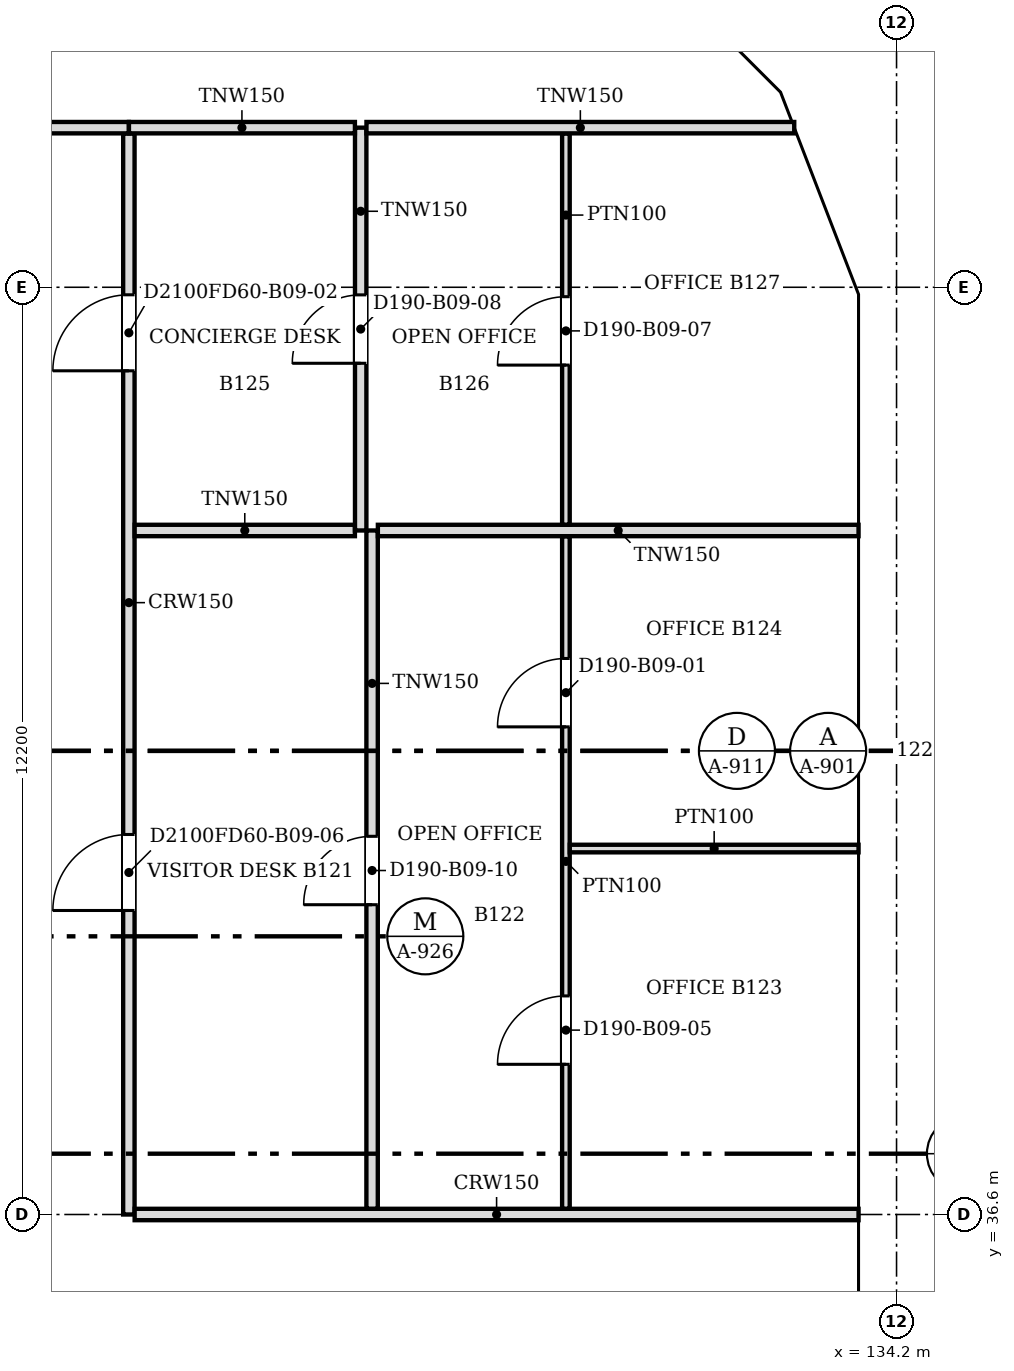
"""IFC4 building model, lengths in metres.
Left out: names, types, materials, properties, quantities, classifications, styles, units other than length and angle.
Written with IfcOpenShell. Run it as: python <this file> out.ifc"""

import sys

from ifc_helpers import new_model, si_unit, direction, frame, frame_2d, origin, place, context, subcontext, project, spatial, polyline, rectangle, outline, extrude, faceted_brep, source, transform, mapped, element, fill, save


model = new_model("IFC4")
c1 = context("Model", 3, precision=1e-05, world=origin(), true_north=direction((0.0, 1.0)))
c2 = subcontext(c1, "Body", "Model", "MODEL_VIEW")
j1 = project(units=[si_unit("LENGTHUNIT", "METRE"), si_unit("PLANEANGLEUNIT", "RADIAN")], contexts=[c1])
p1 = place(None, origin())
s1 = spatial("IfcSite", under=j1, at=p1, CompositionType="ELEMENT")
p2 = place(p1, origin())
s2 = spatial("IfcBuilding", under=s1, at=p2, CompositionType="ELEMENT")
p3 = place(p2, frame((0.0, 0.0, 91.4)))
s3 = spatial("IfcBuildingStorey", under=s2, at=p3, CompositionType="ELEMENT", Elevation=91.4)
m1 = source(origin(), c2, "Body", "SweptSolid", [
    extrude(outline(polyline([(3.05, 0.0), (6.1, 3.8), (3.05, 7.6), (0.0, 3.8), (3.05, 0.0)])), frame((0.0, 0.25, 0.0), z_axis=(0.0, -1.0, 0.0), x_axis=(1.0, 0.0, 0.0)), (0.0, 0.0, 1.0), 0.5),
])
p4 = place(p3, frame((133.95, 30.5, -3.8), z_axis=(0.0, 0.0, 1.0), x_axis=(0.0, 1.0, 0.0)))
e1 = element("IfcWall", 1, at=p4, inside=s3, PredefinedType="SOLIDWALL", context=c2, shape_type="MappedRepresentation", body=[
    mapped(m1, transform((0.0, 0.0, 0.0), scale=1.0)),
])
m2 = source(origin(), c2, "Body", "SweptSolid", [
    extrude(outline(polyline([(3.05, 0.399), (5.78, 3.8), (3.05, 7.2), (0.321, 3.8), (3.05, 0.399)])), frame((0.0, 0.26, 0.0), z_axis=(0.0, -1.0, 0.0), x_axis=(1.0, 0.0, 0.0)), (0.0, 0.0, 1.0), 0.52),
])
p5 = place(p4, origin())
e2 = element("IfcOpeningElement", 2, at=p5, cuts=e1, PredefinedType="OPENING", context=c2, shape_type="MappedRepresentation", body=[
    mapped(m2, transform((0.0, 0.0, 0.0), scale=1.0)),
])
m3 = source(origin(), c2, "Body", "Brep", [
    faceted_brep([(3.05, -0.25, 0.0), (6.1, -0.25, 3.8), (6.1, -0.25, 3.8), (3.05, -0.25, 7.6), (0.0, -0.25, 3.8), (0.0, 0.25, 3.8), (3.05, 0.25, 7.6), (6.1, 0.25, 3.8), (6.1, 0.25, 3.8), (3.05, 0.25, 0.0)], [[[0, 1, 2, 3, 4]], [[5, 6, 7, 8, 9]], [[9, 8, 1, 0]], [[7, 6, 3, 2]], [[6, 5, 4, 3]], [[5, 9, 0, 4]], [[1, 8, 7, 2]]]),
])
p6 = place(p3, frame((133.95, 36.6, -3.8), z_axis=(0.0, 0.0, 1.0), x_axis=(0.0, 1.0, 0.0)))
e3 = element("IfcWall", 3, at=p6, inside=s3, PredefinedType="SOLIDWALL", context=c2, shape_type="MappedRepresentation", body=[
    mapped(m3, transform((0.0, 0.0, 0.0), scale=1.0)),
])
p7 = place(p6, origin())
e4 = element("IfcOpeningElement", 4, at=p7, cuts=e3, PredefinedType="OPENING", context=c2, shape_type="MappedRepresentation", body=[
    mapped(m2, transform((0.0, 0.0, 0.0), scale=1.0)),
])
m4 = source(origin(), c2, "Body", "Brep", [
    faceted_brep([(3.05, -0.25, 0.0), (6.053, -0.25, 3.8), (3.05, -0.25, 7.6), (0.0, -0.25, 3.8), (0.0, 0.25, 3.8), (3.05, 0.25, 7.6), (6.007, 0.25, 3.859), (6.007, 0.25, 3.741), (3.05, 0.25, 0.0), (6.053, 0.0, 3.8)], [[[0, 1, 2, 3]], [[4, 5, 6, 7, 8]], [[8, 7, 9, 1, 0]], [[6, 5, 2, 1, 9]], [[5, 4, 3, 2]], [[4, 8, 0, 3]], [[9, 7, 6]]]),
])
p8 = place(p3, frame((133.95, 42.7, -3.8), z_axis=(0.0, 0.0, 1.0), x_axis=(0.0, 1.0, 0.0)))
e5 = element("IfcWall", 5, at=p8, inside=s3, PredefinedType="SOLIDWALL", context=c2, shape_type="MappedRepresentation", body=[
    mapped(m4, transform((0.0, 0.0, 0.0), scale=1.0)),
])
m5 = source(origin(), c2, "Body", "SweptSolid", [
    extrude(outline(polyline([(3.049, 0.401), (5.735, 3.8), (3.049, 7.199), (0.321, 3.8), (3.049, 0.401)])), frame((0.0, 0.26, 0.0), z_axis=(0.0, -1.0, 0.0), x_axis=(1.0, 0.0, 0.0)), (0.0, 0.0, 1.0), 0.52),
])
p9 = place(p8, origin())
e6 = element("IfcOpeningElement", 6, at=p9, cuts=e5, PredefinedType="OPENING", context=c2, shape_type="MappedRepresentation", body=[
    mapped(m5, transform((0.0, 0.0, 0.0), scale=1.0)),
])
m6 = source(origin(), c2, "Body", "Brep", [
    faceted_brep([(2.95, -0.25, 0.0), (3.003, -0.25, 0.068), (3.003, -0.25, 7.531), (2.95, -0.25, 7.6), (0.0, -0.25, 3.8), (0.047, 0.25, 3.86), (2.898, 0.25, 7.532), (2.898, 0.25, 0.068), (0.047, 0.25, 3.74), (2.95, 0.0, 0.0), (2.95, 0.0, 7.6), (0.0, 0.0, 3.8)], [[[0, 1, 2, 3, 4]], [[5, 6, 7, 8]], [[1, 0, 9]], [[10, 3, 2]], [[6, 5, 11, 4, 3, 10]], [[8, 7, 9, 0, 4, 11]], [[8, 11, 5]], [[1, 9, 7, 6, 10, 2]]]),
])
p10 = place(p3, frame((133.95, 48.753, -3.8), z_axis=(0.0, 0.0, 1.0), x_axis=(-0.359855894603, 0.933007896601, 0.0)))
e7 = element("IfcWall", 7, at=p10, inside=s3, PredefinedType="SOLIDWALL", context=c2, shape_type="MappedRepresentation", body=[
    mapped(m6, transform((0.0, 0.0, 0.0), scale=1.0)),
])
m7 = source(origin(), c2, "Body", "SweptSolid", [
    extrude(outline(polyline([(2.75, 6.935), (0.316, 3.8), (2.75, 0.665), (2.75, 6.935)])), frame((0.0, 0.26, 0.0), z_axis=(0.0, -1.0, 0.0), x_axis=(1.0, 0.0, 0.0)), (0.0, 0.0, 1.0), 0.52),
])
p11 = place(p10, origin())
e8 = element("IfcOpeningElement", 8, at=p11, cuts=e7, PredefinedType="OPENING", context=c2, shape_type="MappedRepresentation", body=[
    mapped(m7, transform((0.0, 0.0, 0.0), scale=1.0)),
])
m8 = source(origin(), c2, "Body", "Brep", [
    faceted_brep([(0.053, -0.25, 0.0), (2.997, -0.25, 3.8), (0.053, -0.25, 7.6), (0.0, -0.25, 7.532), (0.0, -0.25, 0.068), (0.106, 0.25, 7.531), (2.944, 0.25, 3.868), (2.944, 0.25, 3.732), (0.106, 0.25, 0.068), (2.997, 0.0, 3.8), (0.053, 0.0, 0.0), (0.053, 0.0, 7.6)], [[[0, 1, 2, 3, 4]], [[5, 6, 7, 8]], [[8, 7, 9, 1, 0, 10]], [[6, 5, 11, 2, 1, 9]], [[3, 2, 11]], [[10, 0, 4]], [[8, 10, 4, 3, 11, 5]], [[9, 7, 6]]]),
])
p12 = place(p3, frame((132.926, 51.469, -3.8), z_axis=(0.0, 0.0, 1.0), x_axis=(-0.707066050402, 0.707147509625, 0.0)))
e9 = element("IfcWall", 9, at=p12, inside=s3, PredefinedType="SOLIDWALL", context=c2, shape_type="MappedRepresentation", body=[
    mapped(m8, transform((0.0, 0.0, 0.0), scale=1.0)),
])
m9 = source(origin(), c2, "Body", "SweptSolid", [
    extrude(outline(polyline([(0.253, 0.666), (2.681, 3.8), (0.253, 6.934), (0.253, 0.666)])), frame((0.0, 0.26, 0.0), z_axis=(0.0, -1.0, 0.0), x_axis=(1.0, 0.0, 0.0)), (0.0, 0.0, 1.0), 0.52),
])
p13 = place(p12, origin())
e10 = element("IfcOpeningElement", 10, at=p13, cuts=e9, PredefinedType="OPENING", context=c2, shape_type="MappedRepresentation", body=[
    mapped(m9, transform((0.0, 0.0, 0.0), scale=1.0)),
])
m10 = source(origin(), c2, "Body", "Brep", [
    faceted_brep([(3.05, -0.25, 0.0), (6.1, -0.25, 3.8), (6.1, -0.25, 3.8), (0.0, -0.25, 3.8), (0.0, 0.25, 3.8), (6.1, 0.25, 3.8), (6.1, 0.25, 3.8), (3.05, 0.25, 0.0)], [[[0, 1, 2, 3]], [[4, 5, 6, 7]], [[7, 6, 1, 0]], [[5, 4, 3, 2]], [[4, 7, 0, 3]], [[1, 6, 5, 2]]]),
])
p14 = place(p3, frame((133.95, 33.55, 0.0), z_axis=(0.0, 0.0, 1.0), x_axis=(0.0, 1.0, 0.0)))
e11 = element("IfcWall", 11, at=p14, inside=s3, PredefinedType="SOLIDWALL", context=c2, shape_type="MappedRepresentation", body=[
    mapped(m10, transform((0.0, 0.0, 0.0), scale=1.0)),
])
m11 = source(origin(), c2, "Body", "SweptSolid", [
    extrude(outline(polyline([(3.05, 0.399), (5.579, 3.55), (0.521, 3.55), (3.05, 0.399)])), frame((0.0, 0.26, 0.0), z_axis=(0.0, -1.0, 0.0), x_axis=(1.0, 0.0, 0.0)), (0.0, 0.0, 1.0), 0.52),
])
p15 = place(p14, origin())
e12 = element("IfcOpeningElement", 12, at=p15, cuts=e11, PredefinedType="OPENING", context=c2, shape_type="MappedRepresentation", body=[
    mapped(m11, transform((0.0, 0.0, 0.0), scale=1.0)),
])
m12 = source(origin(), c2, "Body", "SweptSolid", [
    extrude(outline(polyline([(3.05, 0.0), (6.1, 3.8), (0.0, 3.8), (3.05, 0.0)])), frame((0.0, 0.25, 0.0), z_axis=(0.0, -1.0, 0.0), x_axis=(1.0, 0.0, 0.0)), (0.0, 0.0, 1.0), 0.5),
])
p16 = place(p3, frame((133.95, 39.65, 0.0), z_axis=(0.0, 0.0, 1.0), x_axis=(0.0, 1.0, 0.0)))
e13 = element("IfcWall", 13, at=p16, inside=s3, PredefinedType="SOLIDWALL", context=c2, shape_type="MappedRepresentation", body=[
    mapped(m12, transform((0.0, 0.0, 0.0), scale=1.0)),
])
p17 = place(p16, origin())
e14 = element("IfcOpeningElement", 14, at=p17, cuts=e13, PredefinedType="OPENING", context=c2, shape_type="MappedRepresentation", body=[
    mapped(m11, transform((0.0, 0.0, 0.0), scale=1.0)),
])
m13 = source(origin(), c2, "Body", "Brep", [
    faceted_brep([(3.003, -0.25, 0.0), (3.05, -0.25, 0.06), (3.05, -0.25, 3.8), (0.0, -0.25, 3.8), (0.0, 0.25, 3.8), (2.957, 0.25, 3.8), (2.957, 0.25, 0.059), (3.003, 0.0, 0.0)], [[[0, 1, 2, 3]], [[4, 5, 6]], [[1, 0, 7]], [[5, 4, 3, 2]], [[4, 6, 7, 0, 3]], [[1, 7, 6, 5, 2]]]),
])
p18 = place(p3, frame((133.95, 45.75, 0.0), z_axis=(0.0, 0.0, 1.0), x_axis=(0.0, 1.0, 0.0)))
e15 = element("IfcWall", 15, at=p18, inside=s3, PredefinedType="SOLIDWALL", context=c2, shape_type="MappedRepresentation", body=[
    mapped(m13, transform((0.0, 0.0, 0.0), scale=1.0)),
])
m14 = source(origin(), c2, "Body", "SweptSolid", [
    extrude(outline(polyline([(2.803, 3.55), (0.516, 3.55), (2.803, 0.656), (2.803, 3.55)])), frame((0.0, 0.26, 0.0), z_axis=(0.0, -1.0, 0.0), x_axis=(1.0, 0.0, 0.0)), (0.0, 0.0, 1.0), 0.52),
])
p19 = place(p18, origin())
e16 = element("IfcOpeningElement", 16, at=p19, cuts=e15, PredefinedType="OPENING", context=c2, shape_type="MappedRepresentation", body=[
    mapped(m14, transform((0.0, 0.0, 0.0), scale=1.0)),
])
m15 = source(origin(), c2, "Body", "Brep", [
    faceted_brep([(0.047, -0.25, 0.0), (2.997, -0.25, 3.8), (0.0, -0.25, 3.8), (0.0, -0.25, 0.059), (0.093, 0.25, 3.8), (2.944, 0.25, 3.8), (2.944, 0.25, 3.732), (0.093, 0.25, 0.06), (2.997, 0.0, 3.8), (0.047, 0.0, 0.0)], [[[0, 1, 2, 3]], [[4, 5, 6, 7]], [[7, 6, 8, 1, 0, 9]], [[5, 4, 2, 1, 8]], [[9, 0, 3]], [[7, 9, 3, 2, 4]], [[6, 5, 8]]]),
])
p20 = place(p3, frame((133.967, 48.71, 0.0), z_axis=(0.0, 0.0, 1.0), x_axis=(-0.359901446078, 0.932990326376, 0.0)))
e17 = element("IfcWall", 17, at=p20, inside=s3, PredefinedType="SOLIDWALL", context=c2, shape_type="MappedRepresentation", body=[
    mapped(m15, transform((0.0, 0.0, 0.0), scale=1.0)),
])
m16 = source(origin(), c2, "Body", "SweptSolid", [
    extrude(outline(polyline([(0.247, 0.665), (2.487, 3.55), (0.247, 3.55), (0.247, 0.665)])), frame((0.0, 0.26, 0.0), z_axis=(0.0, -1.0, 0.0), x_axis=(1.0, 0.0, 0.0)), (0.0, 0.0, 1.0), 0.52),
])
p21 = place(p20, origin())
e18 = element("IfcOpeningElement", 18, at=p21, cuts=e17, PredefinedType="OPENING", context=c2, shape_type="MappedRepresentation", body=[
    mapped(m16, transform((0.0, 0.0, 0.0), scale=1.0)),
])
m17 = source(origin(), c2, "Body", "Brep", [
    faceted_brep([(2.944, -0.25, 0.0), (2.997, -0.25, 0.068), (2.997, -0.25, 3.8), (0.0, -0.25, 3.8), (0.053, 0.25, 3.8), (2.891, 0.25, 3.8), (2.891, 0.25, 0.068), (0.053, 0.25, 3.732), (2.944, 0.0, 0.0), (0.0, 0.0, 3.8)], [[[0, 1, 2, 3]], [[4, 5, 6, 7]], [[1, 0, 8]], [[5, 4, 9, 3, 2]], [[7, 6, 8, 0, 3, 9]], [[7, 9, 4]], [[1, 8, 6, 5, 2]]]),
])
p22 = place(p3, frame((132.888, 51.506, 0.0), z_axis=(0.0, 0.0, 1.0), x_axis=(-0.707147509625, 0.707066050402, 0.0)))
e19 = element("IfcWall", 19, at=p22, inside=s3, PredefinedType="SOLIDWALL", context=c2, shape_type="MappedRepresentation", body=[
    mapped(m17, transform((0.0, 0.0, 0.0), scale=1.0)),
])
m18 = source(origin(), c2, "Body", "SweptSolid", [
    extrude(outline(polyline([(2.744, 3.55), (0.51, 3.55), (2.744, 0.667), (2.744, 3.55)])), frame((0.0, 0.26, 0.0), z_axis=(0.0, -1.0, 0.0), x_axis=(1.0, 0.0, 0.0)), (0.0, 0.0, 1.0), 0.52),
])
p23 = place(p22, origin())
e20 = element("IfcOpeningElement", 20, at=p23, cuts=e19, PredefinedType="OPENING", context=c2, shape_type="MappedRepresentation", body=[
    mapped(m18, transform((0.0, 0.0, 0.0), scale=1.0)),
])
p24 = place(p3, frame((124.1, 50.824, 0.0), z_axis=(0.0, 0.0, 1.0), x_axis=(0.0, -1.0, 0.0)))
e21 = element("IfcWall", 21, at=p24, inside=s3, PredefinedType="PARTITIONING", context=c2, shape_type="SweptSolid", body=[
    extrude(rectangle(XDim=14.224, YDim=0.15, at=frame_2d((7.112, 0.0))), origin(), (0.0, 0.0, 1.0), 2.895),
])
m19 = source(origin(), c2, "Body", "SweptSolid", [
    extrude(rectangle(XDim=1.0, YDim=2.1, at=frame_2d((0.5, 1.05))), frame((0.0, 0.085, 0.0), z_axis=(0.0, -1.0, 0.0), x_axis=(1.0, 0.0, 0.0)), (0.0, 0.0, 1.0), 0.17),
])
p25 = place(p24, frame((2.123, 0.0, 0.0)))
e22 = element("IfcOpeningElement", 22, at=p25, cuts=e21, PredefinedType="OPENING", context=c2, shape_type="MappedRepresentation", body=[
    mapped(m19, transform((0.0, 0.0, 0.0), scale=1.0)),
])
p26 = place(p24, frame((9.224, 0.0, 0.0)))
e23 = element("IfcOpeningElement", 23, at=p26, cuts=e21, PredefinedType="OPENING", context=c2, shape_type="MappedRepresentation", body=[
    mapped(m19, transform((0.0, 0.0, 0.0), scale=1.0)),
])
p27 = place(p3, frame((124.176, 36.6, 0.0), z_axis=(0.0, 0.0, 1.0), x_axis=(1.0, 0.0, 0.0)))
e24 = element("IfcWall", 24, at=p27, inside=s3, PredefinedType="PARTITIONING", context=c2, shape_type="SweptSolid", body=[
    extrude(rectangle(XDim=9.524, YDim=0.15, at=frame_2d((4.762, 0.0))), origin(), (0.0, 0.0, 1.0), 2.895),
])
p28 = place(p3, frame((127.3, 45.6, 0.0), z_axis=(0.0, 0.0, 1.0), x_axis=(0.0, -1.0, 0.0)))
e25 = element("IfcWall", 25, at=p28, inside=s3, PredefinedType="PARTITIONING", context=c2, shape_type="SweptSolid", body=[
    extrude(rectangle(XDim=8.924, YDim=0.15, at=frame_2d((4.462, 0.0))), origin(), (0.0, 0.0, 1.0), 2.895),
])
m20 = source(origin(), c2, "Body", "SweptSolid", [
    extrude(rectangle(XDim=0.9, YDim=2.1, at=frame_2d((0.45, 1.05))), frame((0.0, 0.085, 0.0), z_axis=(0.0, -1.0, 0.0), x_axis=(1.0, 0.0, 0.0)), (0.0, 0.0, 1.0), 0.17),
])
p29 = place(p28, frame((4.024, 0.0, 0.0)))
e26 = element("IfcOpeningElement", 26, at=p29, cuts=e25, PredefinedType="OPENING", context=c2, shape_type="MappedRepresentation", body=[
    mapped(m20, transform((0.0, 0.0, 0.0), scale=1.0)),
])
p30 = place(p3, frame((129.85, 45.524, 0.0), z_axis=(0.0, 0.0, 1.0), x_axis=(0.0, -1.0, 0.0)))
e27 = element("IfcWall", 27, at=p30, inside=s3, PredefinedType="PARTITIONING", context=c2, shape_type="SweptSolid", body=[
    extrude(rectangle(XDim=8.848, YDim=0.1, at=frame_2d((4.424, 0.0))), origin(), (0.0, 0.0, 1.0), 2.895),
])
m21 = source(origin(), c2, "Body", "SweptSolid", [
    extrude(rectangle(XDim=0.9, YDim=2.1, at=frame_2d((0.45, 1.05))), frame((0.0, 0.06, 0.0), z_axis=(0.0, -1.0, 0.0), x_axis=(1.0, 0.0, 0.0)), (0.0, 0.0, 1.0), 0.12),
])
p31 = place(p30, frame((1.608, 0.0, 0.0)))
e28 = element("IfcOpeningElement", 28, at=p31, cuts=e27, PredefinedType="OPENING", context=c2, shape_type="MappedRepresentation", body=[
    mapped(m21, transform((0.0, 0.0, 0.0), scale=1.0)),
])
p32 = place(p30, frame((6.048, 0.0, 0.0)))
e29 = element("IfcOpeningElement", 29, at=p32, cuts=e27, PredefinedType="OPENING", context=c2, shape_type="MappedRepresentation", body=[
    mapped(m21, transform((0.0, 0.0, 0.0), scale=1.0)),
])
p33 = place(p3, frame((129.901, 41.415, 0.0), z_axis=(0.0, 0.0, 1.0), x_axis=(1.0, 0.0, 0.0)))
e30 = element("IfcWall", 30, at=p33, inside=s3, PredefinedType="PARTITIONING", context=c2, shape_type="SweptSolid", body=[
    extrude(rectangle(XDim=3.799, YDim=0.1, at=frame_2d((1.899, 0.0))), origin(), (0.0, 0.0, 1.0), 2.895),
])
p34 = place(p3, frame((124.176, 45.6, 0.0), z_axis=(0.0, 0.0, 1.0), x_axis=(1.0, 0.0, 0.0)))
e31 = element("IfcWall", 31, at=p34, inside=s3, PredefinedType="PARTITIONING", context=c2, shape_type="SweptSolid", body=[
    extrude(rectangle(XDim=2.898, YDim=0.15, at=frame_2d((1.449, 0.0))), origin(), (0.0, 0.0, 1.0), 2.895),
])
p35 = place(p3, frame((127.15, 50.9, 0.0), z_axis=(0.0, 0.0, 1.0), x_axis=(0.0, -1.0, 0.0)))
e32 = element("IfcWall", 32, at=p35, inside=s3, PredefinedType="PARTITIONING", context=c2, shape_type="SweptSolid", body=[
    extrude(rectangle(XDim=5.3, YDim=0.15, at=frame_2d((2.65, 0.0))), origin(), (0.0, 0.0, 1.0), 2.895),
])
p36 = place(p35, frame((2.2, 0.0, 0.0)))
e33 = element("IfcOpeningElement", 33, at=p36, cuts=e32, PredefinedType="OPENING", context=c2, shape_type="MappedRepresentation", body=[
    mapped(m20, transform((0.0, 0.0, 0.0), scale=1.0)),
])
p37 = place(p3, frame((127.376, 45.6, 0.0), z_axis=(0.0, 0.0, 1.0), x_axis=(1.0, 0.0, 0.0)))
e34 = element("IfcWall", 34, at=p37, inside=s3, PredefinedType="PARTITIONING", context=c2, shape_type="SweptSolid", body=[
    extrude(rectangle(XDim=6.324, YDim=0.15, at=frame_2d((3.162, 0.0))), origin(), (0.0, 0.0, 1.0), 2.895),
])
p38 = place(p3, frame((129.85, 50.824, 0.0), z_axis=(0.0, 0.0, 1.0), x_axis=(0.0, -1.0, 0.0)))
e35 = element("IfcWall", 35, at=p38, inside=s3, PredefinedType="PARTITIONING", context=c2, shape_type="SweptSolid", body=[
    extrude(rectangle(XDim=5.148, YDim=0.1, at=frame_2d((2.574, 0.0))), origin(), (0.0, 0.0, 1.0), 2.895),
])
p39 = place(p38, frame((2.148, 0.0, 0.0)))
e36 = element("IfcOpeningElement", 36, at=p39, cuts=e35, PredefinedType="OPENING", context=c2, shape_type="MappedRepresentation", body=[
    mapped(m21, transform((0.0, 0.0, 0.0), scale=1.0)),
])
p40 = place(p3, frame((108.5, 50.9, 0.0), z_axis=(0.0, 0.0, 1.0), x_axis=(1.0, 0.0, 0.0)))
e37 = element("IfcWall", 37, at=p40, inside=s3, PredefinedType="PARTITIONING", context=c2, shape_type="SweptSolid", body=[
    extrude(rectangle(XDim=15.6, YDim=0.15, at=frame_2d((7.8, 0.0))), origin(), (0.0, 0.0, 1.0), 2.895),
])
p41 = place(p40, frame((7.3, 0.0, 0.0)))
e38 = element("IfcOpeningElement", 38, at=p41, cuts=e37, PredefinedType="OPENING", context=c2, shape_type="MappedRepresentation", body=[
    mapped(m20, transform((0.0, 0.0, 0.0), scale=1.0)),
])
p42 = place(p3, frame((124.101, 50.9, 0.0), z_axis=(0.0, 0.0, 1.0), x_axis=(1.0, 0.0, 0.0)))
e39 = element("IfcWall", 39, at=p42, inside=s3, PredefinedType="PARTITIONING", context=c2, shape_type="SweptSolid", body=[
    extrude(rectangle(XDim=2.973, YDim=0.15, at=frame_2d((1.486, 0.0))), origin(), (0.0, 0.0, 1.0), 2.895),
])
p43 = place(p3, frame((127.226, 50.9, 0.0), z_axis=(0.0, 0.0, 1.0), x_axis=(1.0, 0.0, 0.0)))
e40 = element("IfcWall", 40, at=p43, inside=s3, PredefinedType="PARTITIONING", context=c2, shape_type="SweptSolid", body=[
    extrude(rectangle(XDim=5.628, YDim=0.15, at=frame_2d((2.814, 0.0))), origin(), (0.0, 0.0, 1.0), 2.895),
])
m22 = source(origin(), c2, "Body", "SweptSolid", [
    extrude(rectangle(XDim=0.9, YDim=2.1, at=frame_2d((0.45, 1.05))), frame((0.0, 0.025, 0.0), z_axis=(0.0, -1.0, 0.0), x_axis=(1.0, 0.0, 0.0)), (0.0, 0.0, 1.0), 0.05),
])
p44 = place(p31, origin())
e41 = element("IfcDoor", 41, at=p44, inside=s3, OperationType="SINGLE_SWING_RIGHT", PredefinedType="DOOR", context=c2, shape_type="MappedRepresentation", body=[
    mapped(m22, transform((0.0, 0.0, 0.0), scale=1.0)),
])
fill(e28, e41)
p45 = place(p32, origin())
e42 = element("IfcDoor", 42, at=p45, inside=s3, OperationType="SINGLE_SWING_RIGHT", PredefinedType="DOOR", context=c2, shape_type="MappedRepresentation", body=[
    mapped(m22, transform((0.0, 0.0, 0.0), scale=1.0)),
])
fill(e29, e42)
p46 = place(p39, origin())
e43 = element("IfcDoor", 43, at=p46, inside=s3, OperationType="SINGLE_SWING_RIGHT", PredefinedType="DOOR", context=c2, shape_type="MappedRepresentation", body=[
    mapped(m22, transform((0.0, 0.0, 0.0), scale=1.0)),
])
fill(e36, e43)
m23 = source(origin(), c2, "Body", "SweptSolid", [
    extrude(rectangle(XDim=1.0, YDim=2.1, at=frame_2d((0.5, 1.05))), frame((0.0, 0.025, 0.0), z_axis=(0.0, -1.0, 0.0), x_axis=(1.0, 0.0, 0.0)), (0.0, 0.0, 1.0), 0.05),
])
p47 = place(p25, origin())
e44 = element("IfcDoor", 44, at=p47, inside=s3, OperationType="SINGLE_SWING_RIGHT", PredefinedType="DOOR", context=c2, shape_type="MappedRepresentation", body=[
    mapped(m23, transform((0.0, 0.0, 0.0), scale=1.0)),
])
fill(e22, e44)
p48 = place(p36, origin())
e45 = element("IfcDoor", 45, at=p48, inside=s3, OperationType="SINGLE_SWING_RIGHT", PredefinedType="DOOR", context=c2, shape_type="MappedRepresentation", body=[
    mapped(m22, transform((0.0, 0.0, 0.0), scale=1.0)),
])
fill(e33, e45)
p49 = place(p29, origin())
e46 = element("IfcDoor", 46, at=p49, inside=s3, OperationType="SINGLE_SWING_RIGHT", PredefinedType="DOOR", context=c2, shape_type="MappedRepresentation", body=[
    mapped(m22, transform((0.0, 0.0, 0.0), scale=1.0)),
])
fill(e26, e46)
p50 = place(p26, origin())
e47 = element("IfcDoor", 47, at=p50, inside=s3, OperationType="SINGLE_SWING_RIGHT", PredefinedType="DOOR", context=c2, shape_type="MappedRepresentation", body=[
    mapped(m23, transform((0.0, 0.0, 0.0), scale=1.0)),
])
fill(e23, e47)
save(model, sys.argv[1])
